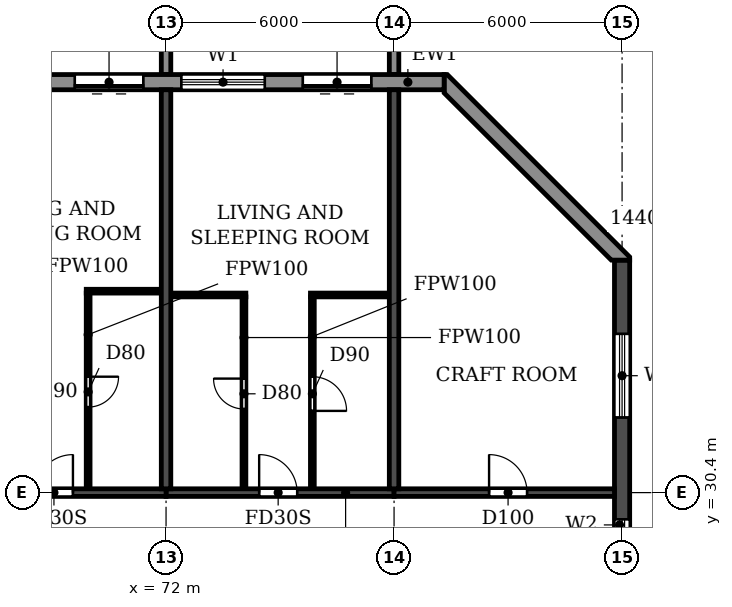
"""IFC4 building model, lengths in metres.
Left out: names, types, materials, properties, quantities, classifications, styles, units other than length and angle.
Written with IfcOpenShell. Run it as: python <this file> out.ifc"""

import sys

from ifc_helpers import new_model, si_unit, direction, frame, frame_2d, origin, place, context, subcontext, project, spatial, polyline, rectangle, outline, extrude, source, transform, mapped, element, fill, save


model = new_model("IFC4")
c1 = context("Model", 3, precision=1e-05, world=origin(), true_north=direction((0.0, 1.0)))
c2 = subcontext(c1, "Body", "Model", "MODEL_VIEW")
j1 = project(units=[si_unit("LENGTHUNIT", "METRE"), si_unit("PLANEANGLEUNIT", "RADIAN")], contexts=[c1])
p1 = place(None, origin())
s1 = spatial("IfcSite", under=j1, at=p1, CompositionType="ELEMENT")
p2 = place(p1, origin())
s2 = spatial("IfcBuilding", under=s1, at=p2, CompositionType="ELEMENT")
p3 = place(p2, frame((0.0, 0.0, 221.4)))
s3 = spatial("IfcBuildingStorey", under=s2, at=p3, CompositionType="ELEMENT", Elevation=221.4)
for number, where, z_axis, x_axis in (
    (1, (72.0, 30.5, 0.0), (0.0, 0.0, 1.0), (0.0, 1.0, 0.0)),
    (2, (78.0, 30.5, 0.0), (0.0, 0.0, 1.0), (0.0, 1.0, 0.0)),
):
    element("IfcWall", number, at=place(p3, frame(where, z_axis=z_axis, x_axis=x_axis)), inside=s3, PredefinedType="SHEAR", context=c2, shape_type="SweptSolid", body=[
        extrude(rectangle(XDim=10.5, YDim=0.25, at=frame_2d((5.25, 0.0))), origin(), (0.0, 0.0, 1.0), 3.08),
    ])
p4 = place(p3, frame((84.0, 4.683, 0.0), z_axis=(0.0, 0.0, 1.0), x_axis=(0.0, 1.0, 0.0)))
e3 = element("IfcWall", 3, at=p4, inside=s3, PredefinedType="SHEAR", context=c2, shape_type="SweptSolid", body=[
    extrude(rectangle(XDim=31.834, YDim=0.4, at=frame_2d((15.917, 0.0))), origin(), (0.0, 0.0, 1.0), 3.08),
])
p5 = place(p4, frame((23.817, 0.0, 0.9)))
e4 = element("IfcOpeningElement", 4, at=p5, cuts=e3, PredefinedType="OPENING", context=c2, shape_type="SweptSolid", body=[
    extrude(rectangle(XDim=1.2, YDim=1.5, at=frame_2d((0.6, 0.75))), frame((0.0, 0.21, 0.0), z_axis=(0.0, -1.0, 0.0), x_axis=(1.0, 0.0, 0.0)), (0.0, 0.0, 1.0), 0.42),
])
p6 = place(p4, frame((8.017, 0.0, 0.9)))
e5 = element("IfcOpeningElement", 5, at=p6, cuts=e3, PredefinedType="OPENING", context=c2, shape_type="SweptSolid", body=[
    extrude(rectangle(XDim=1.2, YDim=1.5, at=frame_2d((0.6, 0.75))), frame((0.0, 0.21, 0.0), z_axis=(0.0, -1.0, 0.0), x_axis=(1.0, 0.0, 0.0)), (0.0, 0.0, 1.0), 0.42),
])
p7 = place(p4, frame((27.694, 0.0, 0.6)))
e6 = element("IfcOpeningElement", 6, at=p7, cuts=e3, PredefinedType="OPENING", context=c2, shape_type="SweptSolid", body=[
    extrude(rectangle(XDim=2.2, YDim=1.8, at=frame_2d((1.1, 0.9))), frame((0.0, 0.21, 0.0), z_axis=(0.0, -1.0, 0.0), x_axis=(1.0, 0.0, 0.0)), (0.0, 0.0, 1.0), 0.42),
])
p8 = place(p4, frame((2.541, 0.0, 0.6)))
e7 = element("IfcOpeningElement", 7, at=p8, cuts=e3, PredefinedType="OPENING", context=c2, shape_type="SweptSolid", body=[
    extrude(rectangle(XDim=2.2, YDim=1.8, at=frame_2d((1.1, 0.9))), frame((0.0, 0.21, 0.0), z_axis=(0.0, -1.0, 0.0), x_axis=(1.0, 0.0, 0.0)), (0.0, 0.0, 1.0), 0.42),
])
p9 = place(p4, frame((15.917, 0.0, 0.9)))
e8 = element("IfcOpeningElement", 8, at=p9, cuts=e3, PredefinedType="OPENING", context=c2, shape_type="SweptSolid", body=[
    extrude(rectangle(XDim=1.2, YDim=1.5, at=frame_2d((0.6, 0.75))), frame((0.0, 0.21, 0.0), z_axis=(0.0, -1.0, 0.0), x_axis=(1.0, 0.0, 0.0)), (0.0, 0.0, 1.0), 0.42),
])
p10 = place(p3, frame((66.0, 30.4, 0.0), z_axis=(0.0, 0.0, 1.0), x_axis=(1.0, 0.0, 0.0)))
e9 = element("IfcWall", 9, at=p10, inside=s3, PredefinedType="SHEAR", context=c2, shape_type="SweptSolid", body=[
    extrude(rectangle(XDim=6.0, YDim=0.2, at=frame_2d((3.0, 0.0))), origin(), (0.0, 0.0, 1.0), 2.48),
])
p11 = place(p10, frame((2.55, 0.0, 0.0)))
e10 = element("IfcOpeningElement", 10, at=p11, cuts=e9, PredefinedType="OPENING", context=c2, shape_type="SweptSolid", body=[
    extrude(rectangle(XDim=1.0, YDim=2.1, at=frame_2d((0.5, 1.05))), frame((0.0, 0.11, 0.0), z_axis=(0.0, -1.0, 0.0), x_axis=(1.0, 0.0, 0.0)), (0.0, 0.0, 1.0), 0.22),
])
p12 = place(p3, frame((72.0, 30.4, 0.0), z_axis=(0.0, 0.0, 1.0), x_axis=(1.0, 0.0, 0.0)))
e11 = element("IfcWall", 11, at=p12, inside=s3, PredefinedType="SHEAR", context=c2, shape_type="SweptSolid", body=[
    extrude(rectangle(XDim=6.0, YDim=0.2, at=frame_2d((3.0, 0.0))), origin(), (0.0, 0.0, 1.0), 2.48),
])
p13 = place(p12, frame((2.45, 0.0, 0.0)))
e12 = element("IfcOpeningElement", 12, at=p13, cuts=e11, PredefinedType="OPENING", context=c2, shape_type="SweptSolid", body=[
    extrude(rectangle(XDim=1.0, YDim=2.1, at=frame_2d((0.5, 1.05))), frame((0.0, 0.11, 0.0), z_axis=(0.0, -1.0, 0.0), x_axis=(1.0, 0.0, 0.0)), (0.0, 0.0, 1.0), 0.22),
])
p14 = place(p3, frame((78.0, 30.4, 0.0), z_axis=(0.0, 0.0, 1.0), x_axis=(1.0, 0.0, 0.0)))
e13 = element("IfcWall", 13, at=p14, inside=s3, PredefinedType="SHEAR", context=c2, shape_type="SweptSolid", body=[
    extrude(rectangle(XDim=5.8, YDim=0.2, at=frame_2d((2.9, 0.0))), origin(), (0.0, 0.0, 1.0), 2.48),
])
p15 = place(p14, frame((2.5, 0.0, 0.0)))
e14 = element("IfcOpeningElement", 14, at=p15, cuts=e13, PredefinedType="OPENING", context=c2, shape_type="SweptSolid", body=[
    extrude(rectangle(XDim=1.0, YDim=2.1, at=frame_2d((0.5, 1.05))), frame((0.0, 0.11, 0.0), z_axis=(0.0, -1.0, 0.0), x_axis=(1.0, 0.0, 0.0)), (0.0, 0.0, 1.0), 0.22),
])
p16 = place(p3, origin())
e15 = element("IfcWall", 15, at=p16, inside=s3, PredefinedType="STANDARD", context=c2, shape_type="SweptSolid", body=[
    extrude(outline(polyline([(84.2, 36.517), (84.2, 36.6), (79.4, 41.4), (79.317, 41.4), (79.317, 40.917), (83.717, 36.517), (84.2, 36.517)])), origin(), (0.0, 0.0, 1.0), 3.08),
])
p17 = place(p3, frame((79.317, 41.2, 0.0), z_axis=(0.0, 0.0, 1.0), x_axis=(-1.0, 0.0, 0.0)))
e16 = element("IfcWall", 16, at=p17, inside=s3, PredefinedType="STANDARD", context=c2, shape_type="SweptSolid", body=[
    extrude(rectangle(XDim=56.634, YDim=0.4, at=frame_2d((28.317, 0.0))), origin(), (0.0, 0.0, 1.0), 3.08),
])
p18 = place(p17, frame((52.717, 0.0, 0.9)))
e17 = element("IfcOpeningElement", 17, at=p18, cuts=e16, PredefinedType="OPENING", context=c2, shape_type="SweptSolid", body=[
    extrude(rectangle(XDim=2.2, YDim=1.5, at=frame_2d((1.1, 0.75))), frame((0.0, 0.21, 0.0), z_axis=(0.0, -1.0, 0.0), x_axis=(1.0, 0.0, 0.0)), (0.0, 0.0, 1.0), 0.42),
])
p19 = place(p17, frame((49.717, 0.0, 0.9)))
e18 = element("IfcOpeningElement", 18, at=p19, cuts=e16, PredefinedType="OPENING", context=c2, shape_type="SweptSolid", body=[
    extrude(rectangle(XDim=2.2, YDim=1.5, at=frame_2d((1.1, 0.75))), frame((0.0, 0.21, 0.0), z_axis=(0.0, -1.0, 0.0), x_axis=(1.0, 0.0, 0.0)), (0.0, 0.0, 1.0), 0.42),
])
p20 = place(p17, frame((46.917, 0.0, 0.0)))
e19 = element("IfcOpeningElement", 19, at=p20, cuts=e16, PredefinedType="OPENING", context=c2, shape_type="SweptSolid", body=[
    extrude(rectangle(XDim=1.8, YDim=2.4, at=frame_2d((0.9, 1.2))), frame((0.0, 0.21, 0.0), z_axis=(0.0, -1.0, 0.0), x_axis=(1.0, 0.0, 0.0)), (0.0, 0.0, 1.0), 0.42),
])
p21 = place(p17, frame((43.717, 0.0, 0.9)))
e20 = element("IfcOpeningElement", 20, at=p21, cuts=e16, PredefinedType="OPENING", context=c2, shape_type="SweptSolid", body=[
    extrude(rectangle(XDim=2.2, YDim=1.5, at=frame_2d((1.1, 0.75))), frame((0.0, 0.21, 0.0), z_axis=(0.0, -1.0, 0.0), x_axis=(1.0, 0.0, 0.0)), (0.0, 0.0, 1.0), 0.42),
])
p22 = place(p17, frame((40.717, 0.0, 0.9)))
e21 = element("IfcOpeningElement", 21, at=p22, cuts=e16, PredefinedType="OPENING", context=c2, shape_type="SweptSolid", body=[
    extrude(rectangle(XDim=2.2, YDim=1.5, at=frame_2d((1.1, 0.75))), frame((0.0, 0.21, 0.0), z_axis=(0.0, -1.0, 0.0), x_axis=(1.0, 0.0, 0.0)), (0.0, 0.0, 1.0), 0.42),
])
p23 = place(p17, frame((37.917, 0.0, 0.0)))
e22 = element("IfcOpeningElement", 22, at=p23, cuts=e16, PredefinedType="OPENING", context=c2, shape_type="SweptSolid", body=[
    extrude(rectangle(XDim=1.8, YDim=2.4, at=frame_2d((0.9, 1.2))), frame((0.0, 0.21, 0.0), z_axis=(0.0, -1.0, 0.0), x_axis=(1.0, 0.0, 0.0)), (0.0, 0.0, 1.0), 0.42),
])
p24 = place(p17, frame((34.717, 0.0, 0.9)))
e23 = element("IfcOpeningElement", 23, at=p24, cuts=e16, PredefinedType="OPENING", context=c2, shape_type="SweptSolid", body=[
    extrude(rectangle(XDim=2.2, YDim=1.5, at=frame_2d((1.1, 0.75))), frame((0.0, 0.21, 0.0), z_axis=(0.0, -1.0, 0.0), x_axis=(1.0, 0.0, 0.0)), (0.0, 0.0, 1.0), 0.42),
])
p25 = place(p17, frame((31.717, 0.0, 0.9)))
e24 = element("IfcOpeningElement", 24, at=p25, cuts=e16, PredefinedType="OPENING", context=c2, shape_type="SweptSolid", body=[
    extrude(rectangle(XDim=2.2, YDim=1.5, at=frame_2d((1.1, 0.75))), frame((0.0, 0.21, 0.0), z_axis=(0.0, -1.0, 0.0), x_axis=(1.0, 0.0, 0.0)), (0.0, 0.0, 1.0), 0.42),
])
p26 = place(p17, frame((28.717, 0.0, 0.9)))
e25 = element("IfcOpeningElement", 25, at=p26, cuts=e16, PredefinedType="OPENING", context=c2, shape_type="SweptSolid", body=[
    extrude(rectangle(XDim=2.2, YDim=1.5, at=frame_2d((1.1, 0.75))), frame((0.0, 0.21, 0.0), z_axis=(0.0, -1.0, 0.0), x_axis=(1.0, 0.0, 0.0)), (0.0, 0.0, 1.0), 0.42),
])
p27 = place(p17, frame((25.917, 0.0, 0.0)))
e26 = element("IfcOpeningElement", 26, at=p27, cuts=e16, PredefinedType="OPENING", context=c2, shape_type="SweptSolid", body=[
    extrude(rectangle(XDim=1.8, YDim=2.4, at=frame_2d((0.9, 1.2))), frame((0.0, 0.21, 0.0), z_axis=(0.0, -1.0, 0.0), x_axis=(1.0, 0.0, 0.0)), (0.0, 0.0, 1.0), 0.42),
])
p28 = place(p17, frame((22.717, 0.0, 0.9)))
e27 = element("IfcOpeningElement", 27, at=p28, cuts=e16, PredefinedType="OPENING", context=c2, shape_type="SweptSolid", body=[
    extrude(rectangle(XDim=2.2, YDim=1.5, at=frame_2d((1.1, 0.75))), frame((0.0, 0.21, 0.0), z_axis=(0.0, -1.0, 0.0), x_axis=(1.0, 0.0, 0.0)), (0.0, 0.0, 1.0), 0.42),
])
p29 = place(p17, frame((19.717, 0.0, 0.9)))
e28 = element("IfcOpeningElement", 28, at=p29, cuts=e16, PredefinedType="OPENING", context=c2, shape_type="SweptSolid", body=[
    extrude(rectangle(XDim=2.2, YDim=1.5, at=frame_2d((1.1, 0.75))), frame((0.0, 0.21, 0.0), z_axis=(0.0, -1.0, 0.0), x_axis=(1.0, 0.0, 0.0)), (0.0, 0.0, 1.0), 0.42),
])
p30 = place(p17, frame((16.717, 0.0, 0.9)))
e29 = element("IfcOpeningElement", 29, at=p30, cuts=e16, PredefinedType="OPENING", context=c2, shape_type="SweptSolid", body=[
    extrude(rectangle(XDim=2.2, YDim=1.5, at=frame_2d((1.1, 0.75))), frame((0.0, 0.21, 0.0), z_axis=(0.0, -1.0, 0.0), x_axis=(1.0, 0.0, 0.0)), (0.0, 0.0, 1.0), 0.42),
])
p31 = place(p17, frame((13.917, 0.0, 0.0)))
e30 = element("IfcOpeningElement", 30, at=p31, cuts=e16, PredefinedType="OPENING", context=c2, shape_type="SweptSolid", body=[
    extrude(rectangle(XDim=1.8, YDim=2.4, at=frame_2d((0.9, 1.2))), frame((0.0, 0.21, 0.0), z_axis=(0.0, -1.0, 0.0), x_axis=(1.0, 0.0, 0.0)), (0.0, 0.0, 1.0), 0.42),
])
p32 = place(p17, frame((10.717, 0.0, 0.9)))
e31 = element("IfcOpeningElement", 31, at=p32, cuts=e16, PredefinedType="OPENING", context=c2, shape_type="SweptSolid", body=[
    extrude(rectangle(XDim=2.2, YDim=1.5, at=frame_2d((1.1, 0.75))), frame((0.0, 0.21, 0.0), z_axis=(0.0, -1.0, 0.0), x_axis=(1.0, 0.0, 0.0)), (0.0, 0.0, 1.0), 0.42),
])
p33 = place(p17, frame((7.917, 0.0, 0.0)))
e32 = element("IfcOpeningElement", 32, at=p33, cuts=e16, PredefinedType="OPENING", context=c2, shape_type="SweptSolid", body=[
    extrude(rectangle(XDim=1.8, YDim=2.4, at=frame_2d((0.9, 1.2))), frame((0.0, 0.21, 0.0), z_axis=(0.0, -1.0, 0.0), x_axis=(1.0, 0.0, 0.0)), (0.0, 0.0, 1.0), 0.42),
])
p34 = place(p17, frame((4.717, 0.0, 0.9)))
e33 = element("IfcOpeningElement", 33, at=p34, cuts=e16, PredefinedType="OPENING", context=c2, shape_type="SweptSolid", body=[
    extrude(rectangle(XDim=2.2, YDim=1.5, at=frame_2d((1.1, 0.75))), frame((0.0, 0.21, 0.0), z_axis=(0.0, -1.0, 0.0), x_axis=(1.0, 0.0, 0.0)), (0.0, 0.0, 1.0), 0.42),
])
p35 = place(p17, frame((1.917, 0.0, 0.0)))
e34 = element("IfcOpeningElement", 34, at=p35, cuts=e16, PredefinedType="OPENING", context=c2, shape_type="SweptSolid", body=[
    extrude(rectangle(XDim=1.8, YDim=2.4, at=frame_2d((0.9, 1.2))), frame((0.0, 0.21, 0.0), z_axis=(0.0, -1.0, 0.0), x_axis=(1.0, 0.0, 0.0)), (0.0, 0.0, 1.0), 0.42),
])
m1 = source(origin(), c2, "Body", "SweptSolid", [
    extrude(outline(polyline([(0.0, 0.0), (0.25, 0.0), (0.25, 3.1), (0.0, 3.1), (0.0, 0.0)])), origin(), (0.0, 0.0, 1.0), 3.1),
])
for number, where in (
    (35, (71.875, 41.4, 0.0)),
    (36, (77.875, 41.4, 0.0)),
):
    element("IfcWall", number, at=place(p3, frame(where)), inside=s3, PredefinedType="STANDARD", context=c2, shape_type="MappedRepresentation", body=[
        mapped(m1, transform((0.0, 0.0, 0.0))),
    ])
p36 = place(p3, frame((72.135, 35.6, 0.0), z_axis=(0.0, 0.0, 1.0), x_axis=(1.0, 0.0, 0.0)))
e37 = element("IfcWall", 37, at=p36, inside=s3, PredefinedType="PARTITIONING", context=c2, shape_type="SweptSolid", body=[
    extrude(rectangle(XDim=1.965, YDim=0.1, at=frame_2d((0.982, 0.0))), origin(), (0.0, 0.0, 1.0), 3.08),
])
p37 = place(p3, frame((75.8, 35.6, 0.0), z_axis=(0.0, 0.0, 1.0), x_axis=(1.0, 0.0, 0.0)))
e38 = element("IfcWall", 38, at=p37, inside=s3, PredefinedType="PARTITIONING", context=c2, shape_type="SweptSolid", body=[
    extrude(rectangle(XDim=2.065, YDim=0.1, at=frame_2d((1.032, 0.0))), origin(), (0.0, 0.0, 1.0), 3.08),
])
p38 = place(p3, frame((69.9, 35.7, 0.0), z_axis=(0.0, 0.0, 1.0), x_axis=(1.0, 0.0, 0.0)))
e39 = element("IfcWall", 39, at=p38, inside=s3, PredefinedType="PARTITIONING", context=c2, shape_type="SweptSolid", body=[
    extrude(rectangle(XDim=1.965, YDim=0.1, at=frame_2d((0.982, 0.0))), origin(), (0.0, 0.0, 1.0), 3.08),
])
p39 = place(p3, frame((69.95, 30.51, 0.0), z_axis=(0.0, 0.0, 1.0), x_axis=(0.0, 1.0, 0.0)))
e40 = element("IfcWall", 40, at=p39, inside=s3, PredefinedType="PARTITIONING", context=c2, shape_type="SweptSolid", body=[
    extrude(rectangle(XDim=5.14, YDim=0.1, at=frame_2d((2.57, 0.0))), origin(), (0.0, 0.0, 1.0), 3.08),
])
p40 = place(p39, frame((2.14, 0.0, 0.0)))
e41 = element("IfcOpeningElement", 41, at=p40, cuts=e40, PredefinedType="OPENING", context=c2, shape_type="SweptSolid", body=[
    extrude(rectangle(XDim=0.8, YDim=2.1, at=frame_2d((0.4, 1.05))), frame((0.0, 0.06, 0.0), z_axis=(0.0, -1.0, 0.0), x_axis=(1.0, 0.0, 0.0)), (0.0, 0.0, 1.0), 0.12),
])
p41 = place(p3, frame((74.05, 30.51, 0.0), z_axis=(0.0, 0.0, 1.0), x_axis=(0.0, 1.0, 0.0)))
e42 = element("IfcWall", 42, at=p41, inside=s3, PredefinedType="PARTITIONING", context=c2, shape_type="SweptSolid", body=[
    extrude(rectangle(XDim=5.04, YDim=0.1, at=frame_2d((2.52, 0.0))), origin(), (0.0, 0.0, 1.0), 3.08),
])
p42 = place(p41, frame((2.09, 0.0, 0.0)))
e43 = element("IfcOpeningElement", 43, at=p42, cuts=e42, PredefinedType="OPENING", context=c2, shape_type="SweptSolid", body=[
    extrude(rectangle(XDim=0.8, YDim=2.1, at=frame_2d((0.4, 1.05))), frame((0.0, 0.06, 0.0), z_axis=(0.0, -1.0, 0.0), x_axis=(1.0, 0.0, 0.0)), (0.0, 0.0, 1.0), 0.12),
])
p43 = place(p3, frame((75.85, 30.51, 0.0), z_axis=(0.0, 0.0, 1.0), x_axis=(0.0, 1.0, 0.0)))
e44 = element("IfcWall", 44, at=p43, inside=s3, PredefinedType="PARTITIONING", context=c2, shape_type="SweptSolid", body=[
    extrude(rectangle(XDim=5.04, YDim=0.1, at=frame_2d((2.52, 0.0))), origin(), (0.0, 0.0, 1.0), 3.08),
])
p44 = place(p43, frame((2.04, 0.0, 0.0)))
e45 = element("IfcOpeningElement", 45, at=p44, cuts=e44, PredefinedType="OPENING", context=c2, shape_type="SweptSolid", body=[
    extrude(rectangle(XDim=0.9, YDim=2.1, at=frame_2d((0.45, 1.05))), frame((0.0, 0.06, 0.0), z_axis=(0.0, -1.0, 0.0), x_axis=(1.0, 0.0, 0.0)), (0.0, 0.0, 1.0), 0.12),
])
p45 = place(p5, origin())
e46 = element("IfcWindow", 46, at=p45, inside=s3, PartitioningType="SINGLE_PANEL", PredefinedType="WINDOW", context=c2, shape_type="SweptSolid", body=[
    extrude(rectangle(XDim=1.2, YDim=1.5, at=frame_2d((0.6, 0.75))), frame((0.0, 0.03, 0.0), z_axis=(0.0, -1.0, 0.0), x_axis=(1.0, 0.0, 0.0)), (0.0, 0.0, 1.0), 0.06),
])
fill(e4, e46)
p46 = place(p7, origin())
e47 = element("IfcWindow", 47, at=p46, inside=s3, PartitioningType="DOUBLE_PANEL_HORIZONTAL", PredefinedType="WINDOW", context=c2, shape_type="SweptSolid", body=[
    extrude(rectangle(XDim=2.2, YDim=1.8, at=frame_2d((1.1, 0.9))), frame((0.0, 0.03, 0.0), z_axis=(0.0, -1.0, 0.0), x_axis=(1.0, 0.0, 0.0)), (0.0, 0.0, 1.0), 0.06),
])
fill(e6, e47)
p47 = place(p33, origin())
e48 = element("IfcDoor", 48, at=p47, inside=s3, OperationType="DOUBLE_DOOR_SLIDING", PredefinedType="DOOR", context=c2, shape_type="SweptSolid", body=[
    extrude(rectangle(XDim=1.8, YDim=2.4, at=frame_2d((0.9, 1.2))), frame((0.0, 0.025, 0.0), z_axis=(0.0, -1.0, 0.0), x_axis=(1.0, 0.0, 0.0)), (0.0, 0.0, 1.0), 0.05),
])
fill(e32, e48)
p48 = place(p34, origin())
e49 = element("IfcWindow", 49, at=p48, inside=s3, PartitioningType="DOUBLE_PANEL_HORIZONTAL", PredefinedType="WINDOW", context=c2, shape_type="SweptSolid", body=[
    extrude(rectangle(XDim=2.2, YDim=1.5, at=frame_2d((1.1, 0.75))), frame((0.0, 0.03, 0.0), z_axis=(0.0, -1.0, 0.0), x_axis=(1.0, 0.0, 0.0)), (0.0, 0.0, 1.0), 0.06),
])
fill(e33, e49)
p49 = place(p35, origin())
e50 = element("IfcDoor", 50, at=p49, inside=s3, OperationType="DOUBLE_DOOR_SLIDING", PredefinedType="DOOR", context=c2, shape_type="SweptSolid", body=[
    extrude(rectangle(XDim=1.8, YDim=2.4, at=frame_2d((0.9, 1.2))), frame((0.0, 0.025, 0.0), z_axis=(0.0, -1.0, 0.0), x_axis=(1.0, 0.0, 0.0)), (0.0, 0.0, 1.0), 0.05),
])
fill(e34, e50)
p50 = place(p11, origin())
e51 = element("IfcDoor", 51, at=p50, inside=s3, OperationType="SINGLE_SWING_RIGHT", PredefinedType="DOOR", context=c2, shape_type="SweptSolid", body=[
    extrude(rectangle(XDim=1.0, YDim=2.1, at=frame_2d((0.5, 1.05))), frame((0.0, 0.025, 0.0), z_axis=(0.0, -1.0, 0.0), x_axis=(1.0, 0.0, 0.0)), (0.0, 0.0, 1.0), 0.05),
])
fill(e10, e51)
p51 = place(p40, frame((0.8, 0.0, 0.0), z_axis=(0.0, 0.0, 1.0), x_axis=(-1.0, 0.0, 0.0)))
e52 = element("IfcDoor", 52, at=p51, inside=s3, OperationType="SINGLE_SWING_LEFT", PredefinedType="DOOR", context=c2, shape_type="SweptSolid", body=[
    extrude(rectangle(XDim=0.8, YDim=2.1, at=frame_2d((0.4, 1.05))), frame((0.0, 0.025, 0.0), z_axis=(0.0, -1.0, 0.0), x_axis=(1.0, 0.0, 0.0)), (0.0, 0.0, 1.0), 0.05),
])
fill(e41, e52)
p52 = place(p42, origin())
e53 = element("IfcDoor", 53, at=p52, inside=s3, OperationType="SINGLE_SWING_RIGHT", PredefinedType="DOOR", context=c2, shape_type="SweptSolid", body=[
    extrude(rectangle(XDim=0.8, YDim=2.1, at=frame_2d((0.4, 1.05))), frame((0.0, 0.025, 0.0), z_axis=(0.0, -1.0, 0.0), x_axis=(1.0, 0.0, 0.0)), (0.0, 0.0, 1.0), 0.05),
])
fill(e43, e53)
p53 = place(p13, origin())
e54 = element("IfcDoor", 54, at=p53, inside=s3, OperationType="SINGLE_SWING_LEFT", PredefinedType="DOOR", context=c2, shape_type="SweptSolid", body=[
    extrude(rectangle(XDim=1.0, YDim=2.1, at=frame_2d((0.5, 1.05))), frame((0.0, 0.025, 0.0), z_axis=(0.0, -1.0, 0.0), x_axis=(1.0, 0.0, 0.0)), (0.0, 0.0, 1.0), 0.05),
])
fill(e12, e54)
p54 = place(p44, frame((0.9, 0.0, 0.0), z_axis=(0.0, 0.0, 1.0), x_axis=(-1.0, 0.0, 0.0)))
e55 = element("IfcDoor", 55, at=p54, inside=s3, OperationType="SINGLE_SWING_RIGHT", PredefinedType="DOOR", context=c2, shape_type="SweptSolid", body=[
    extrude(rectangle(XDim=0.9, YDim=2.1, at=frame_2d((0.45, 1.05))), frame((0.0, 0.025, 0.0), z_axis=(0.0, -1.0, 0.0), x_axis=(1.0, 0.0, 0.0)), (0.0, 0.0, 1.0), 0.05),
])
fill(e45, e55)
p55 = place(p15, origin())
e56 = element("IfcDoor", 56, at=p55, inside=s3, OperationType="SINGLE_SWING_LEFT", PredefinedType="DOOR", context=c2, shape_type="SweptSolid", body=[
    extrude(rectangle(XDim=1.0, YDim=2.1, at=frame_2d((0.5, 1.05))), frame((0.0, 0.025, 0.0), z_axis=(0.0, -1.0, 0.0), x_axis=(1.0, 0.0, 0.0)), (0.0, 0.0, 1.0), 0.05),
])
fill(e14, e56)
save(model, sys.argv[1])
